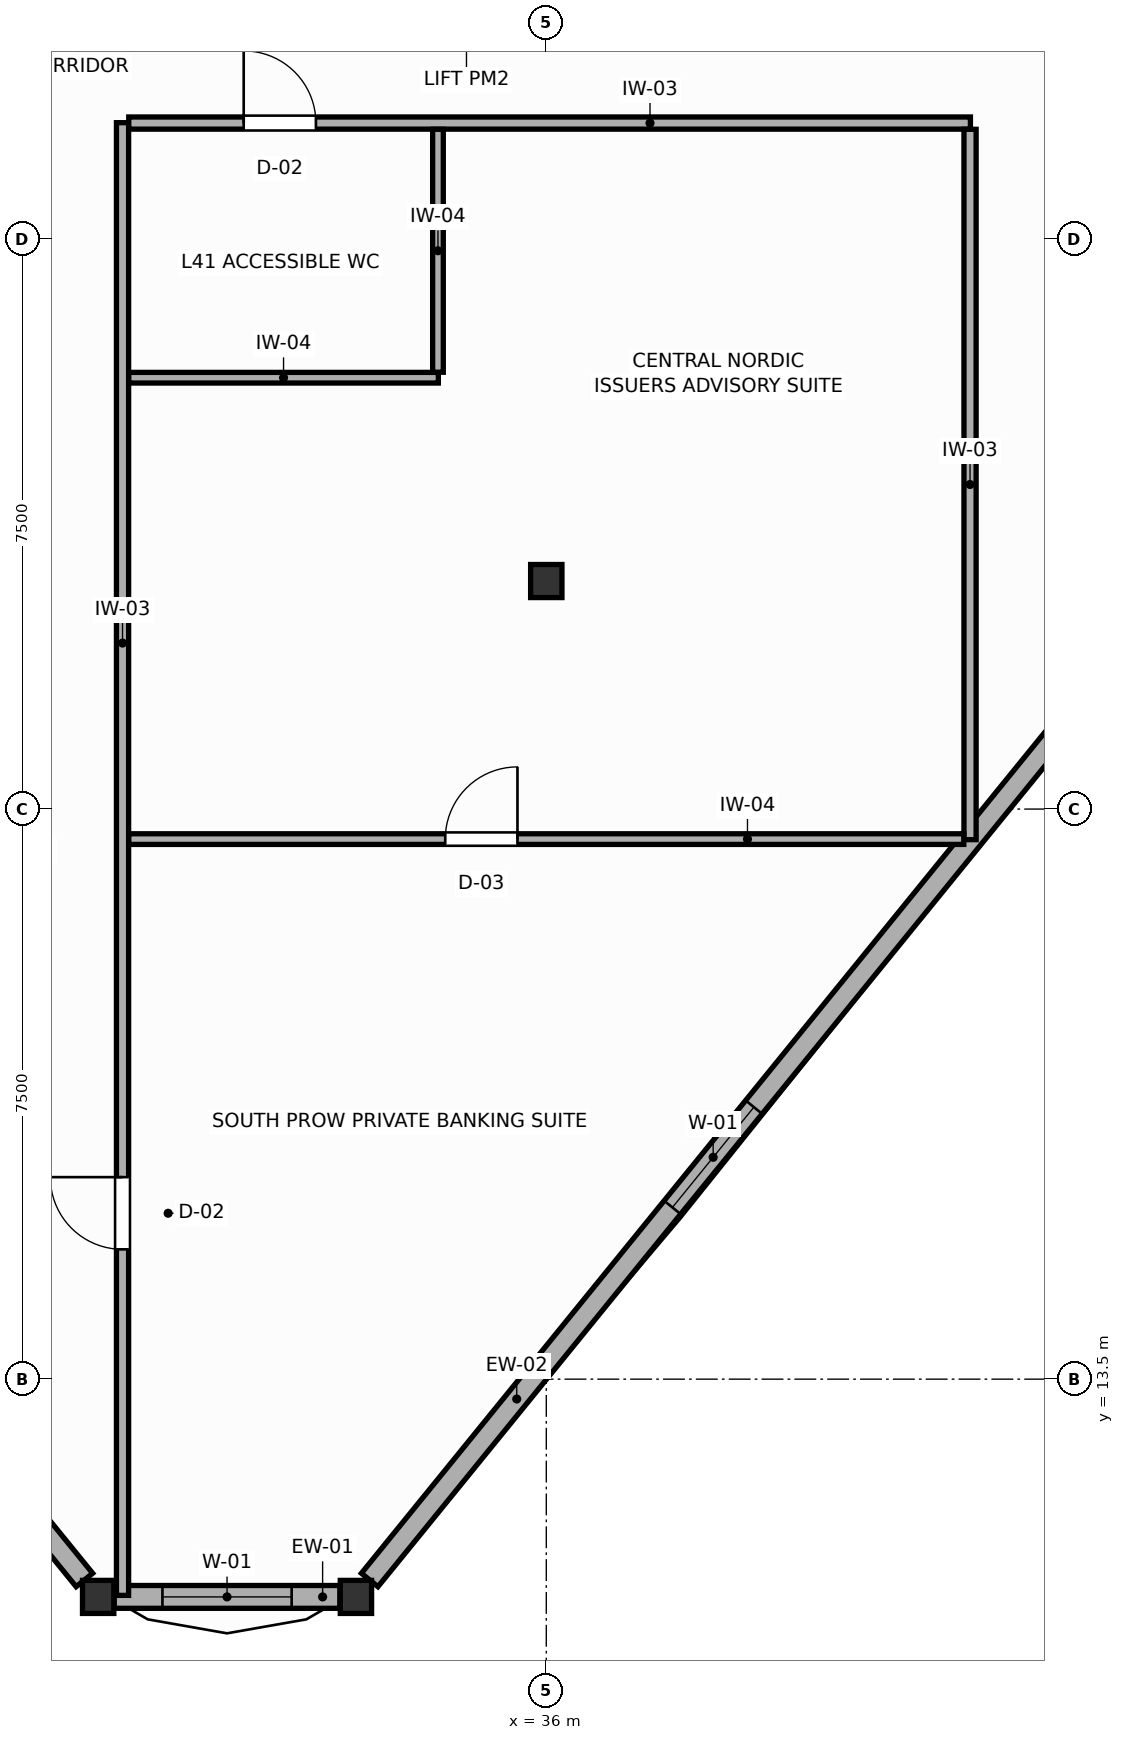
"""IFC4 building model, lengths in metres.
Left out: names, types, materials, properties, quantities, classifications, styles, units other than length and angle.
Written with IfcOpenShell. Run it as: python <this file> out.ifc"""

import sys

from ifc_helpers import new_model, si_unit, direction, frame, frame_2d, origin, origin_2d, place, context, subcontext, project, spatial, rectangle, i_section, extrude, source, transform, mapped, element, fill, save


model = new_model("IFC4")
c1 = context("Model", 3, precision=1e-05, world=origin(), true_north=direction((0.0, 1.0)))
c2 = subcontext(c1, "Body", "Model", "MODEL_VIEW")
j1 = project(units=[si_unit("LENGTHUNIT", "METRE"), si_unit("PLANEANGLEUNIT", "RADIAN")], contexts=[c1])
p1 = place(None, origin())
s1 = spatial("IfcSite", under=j1, at=p1, CompositionType="ELEMENT")
p2 = place(p1, origin())
s2 = spatial("IfcBuilding", under=s1, at=p2, CompositionType="ELEMENT")
p3 = place(p2, frame((0.0, 0.0, 161.4)))
s3 = spatial("IfcBuildingStorey", under=s2, at=p3, CompositionType="ELEMENT", Elevation=161.4)
m1 = source(origin(), c2, "Body", "SweptSolid", [
    extrude(i_section(OverallWidth=0.412, OverallDepth=0.435, WebThickness=0.033, FlangeThickness=0.053, FilletRadius=0.015, at=origin_2d()), origin(), (0.0, 0.0, 1.0), 3.6),
])
for number, where, z_axis, x_axis in (
    (1, (36.0, 24.0, 0.0), (0.0, 0.0, 1.0), (1.0, 0.0, 0.0)),
    (2, (30.104, 10.635, 0.0), (0.0, 0.0, 1.0), (1.0, 0.0, 0.0)),
    (3, (33.496, 10.635, 0.0), (0.0, 0.0, 1.0), (1.0, 0.0, 0.0)),
):
    element("IfcColumn", number, at=place(p3, frame(where, z_axis=z_axis, x_axis=x_axis)), inside=s3, PredefinedType="COLUMN", context=c2, shape_type="MappedRepresentation", body=[
        mapped(m1, transform((0.0, 0.0, 0.0), scale=1.0)),
    ])
p4 = place(p3, frame((20.885, 21.98, 0.0), z_axis=(0.0, 0.0, 1.0), x_axis=(0.630659963665, -0.776059282678, 0.0)))
e4 = element("IfcWall", 4, at=p4, inside=s3, PredefinedType="SOLIDWALL", context=c2, shape_type="SweptSolid", body=[
    extrude(rectangle(XDim=14.331, YDim=0.28, at=frame_2d((7.166, 0.0))), origin(), (0.0, 0.0, 1.0), 3.0),
])
p5 = place(p4, frame((6.316, 0.0, 0.75)))
e5 = element("IfcOpeningElement", 5, at=p5, cuts=e4, PredefinedType="OPENING", context=c2, shape_type="SweptSolid", body=[
    extrude(rectangle(XDim=1.7, YDim=1.75, at=frame_2d((0.85, 0.875))), frame((0.0, 0.15, 0.0), z_axis=(0.0, -1.0, 0.0), x_axis=(1.0, 0.0, 0.0)), (0.0, 0.0, 1.0), 0.3),
])
p6 = place(p3, frame((30.315, 10.635, 0.0), z_axis=(0.0, 0.0, 1.0), x_axis=(1.0, 0.0, 0.0)))
e6 = element("IfcWall", 6, at=p6, inside=s3, PredefinedType="SOLIDWALL", context=c2, shape_type="SweptSolid", body=[
    extrude(rectangle(XDim=2.969, YDim=0.3, at=frame_2d((1.485, 0.0))), origin(), (0.0, 0.0, 1.0), 3.0),
])
p7 = place(p6, frame((0.635, 0.0, 0.75)))
e7 = element("IfcOpeningElement", 7, at=p7, cuts=e6, PredefinedType="OPENING", context=c2, shape_type="SweptSolid", body=[
    extrude(rectangle(XDim=1.7, YDim=1.75, at=frame_2d((0.85, 0.875))), frame((0.0, 0.16, 0.0), z_axis=(0.0, -1.0, 0.0), x_axis=(1.0, 0.0, 0.0)), (0.0, 0.0, 1.0), 0.32),
])
p8 = place(p3, frame((33.677, 10.858, 0.0), z_axis=(0.0, 0.0, 1.0), x_axis=(0.630649703469, 0.776067620452, 0.0)))
e8 = element("IfcWall", 8, at=p8, inside=s3, PredefinedType="SOLIDWALL", context=c2, shape_type="SweptSolid", body=[
    extrude(rectangle(XDim=14.331, YDim=0.28, at=frame_2d((7.166, 0.0))), origin(), (0.0, 0.0, 1.0), 3.0),
])
p9 = place(p8, frame((6.316, 0.0, 0.75)))
e9 = element("IfcOpeningElement", 9, at=p9, cuts=e8, PredefinedType="OPENING", context=c2, shape_type="SweptSolid", body=[
    extrude(rectangle(XDim=1.7, YDim=1.75, at=frame_2d((0.85, 0.875))), frame((0.0, 0.15, 0.0), z_axis=(0.0, -1.0, 0.0), x_axis=(1.0, 0.0, 0.0)), (0.0, 0.0, 1.0), 0.3),
])
p10 = place(p3, frame((30.425, 10.655, 0.0), z_axis=(0.0, 0.0, 1.0), x_axis=(0.0, 1.0, 0.0)))
e10 = element("IfcWall", 10, at=p10, inside=s3, PredefinedType="PARTITIONING", context=c2, shape_type="SweptSolid", body=[
    extrude(rectangle(XDim=19.375, YDim=0.16, at=frame_2d((9.688, 0.0))), origin(), (0.0, 0.0, 1.0), 3.4),
])
p11 = place(p10, frame((4.552, 0.0, 0.0)))
e11 = element("IfcOpeningElement", 11, at=p11, cuts=e10, PredefinedType="OPENING", context=c2, shape_type="SweptSolid", body=[
    extrude(rectangle(XDim=0.95, YDim=2.05, at=frame_2d((0.475, 1.025))), frame((0.0, 0.09, 0.0), z_axis=(0.0, -1.0, 0.0), x_axis=(1.0, 0.0, 0.0)), (0.0, 0.0, 1.0), 0.18),
])
p12 = place(p3, frame((30.507, 30.025, 0.0), z_axis=(0.0, 0.0, 1.0), x_axis=(1.0, 0.0, 0.0)))
e12 = element("IfcWall", 12, at=p12, inside=s3, PredefinedType="PARTITIONING", context=c2, shape_type="SweptSolid", body=[
    extrude(rectangle(XDim=11.073, YDim=0.16, at=frame_2d((5.537, 0.0))), origin(), (0.0, 0.0, 1.0), 3.4),
])
p13 = place(p12, frame((1.512, 0.0, 0.0)))
e13 = element("IfcOpeningElement", 13, at=p13, cuts=e12, PredefinedType="OPENING", context=c2, shape_type="SweptSolid", body=[
    extrude(rectangle(XDim=0.95, YDim=2.05, at=frame_2d((0.475, 1.025))), frame((0.0, 0.09, 0.0), z_axis=(0.0, -1.0, 0.0), x_axis=(1.0, 0.0, 0.0)), (0.0, 0.0, 1.0), 0.18),
])
p14 = place(p3, frame((41.575, 20.598, 0.0), z_axis=(0.0, 0.0, 1.0), x_axis=(0.0, 1.0, 0.0)))
e14 = element("IfcWall", 14, at=p14, inside=s3, PredefinedType="PARTITIONING", context=c2, shape_type="SweptSolid", body=[
    extrude(rectangle(XDim=9.345, YDim=0.16, at=frame_2d((4.673, 0.0))), origin(), (0.0, 0.0, 1.0), 3.4),
])
p15 = place(p3, frame((30.507, 20.605, 0.0), z_axis=(0.0, 0.0, 1.0), x_axis=(1.0, 0.0, 0.0)))
e15 = element("IfcWall", 15, at=p15, inside=s3, PredefinedType="PARTITIONING", context=c2, shape_type="SweptSolid", body=[
    extrude(rectangle(XDim=10.986, YDim=0.14, at=frame_2d((5.493, 0.0))), origin(), (0.0, 0.0, 1.0), 3.4),
])
p16 = place(p15, frame((4.164, 0.0, 0.0)))
e16 = element("IfcOpeningElement", 16, at=p16, cuts=e15, PredefinedType="OPENING", context=c2, shape_type="SweptSolid", body=[
    extrude(rectangle(XDim=0.95, YDim=2.05, at=frame_2d((0.475, 1.025))), frame((0.0, 0.08, 0.0), z_axis=(0.0, -1.0, 0.0), x_axis=(1.0, 0.0, 0.0)), (0.0, 0.0, 1.0), 0.16),
])
p17 = place(p3, frame((30.507, 26.675, 0.0), z_axis=(0.0, 0.0, 1.0), x_axis=(1.0, 0.0, 0.0)))
e17 = element("IfcWall", 17, at=p17, inside=s3, PredefinedType="PARTITIONING", context=c2, shape_type="SweptSolid", body=[
    extrude(rectangle(XDim=4.073, YDim=0.14, at=frame_2d((2.037, 0.0))), origin(), (0.0, 0.0, 1.0), 3.4),
])
p18 = place(p3, frame((34.575, 26.747, 0.0), z_axis=(0.0, 0.0, 1.0), x_axis=(0.0, 1.0, 0.0)))
e18 = element("IfcWall", 18, at=p18, inside=s3, PredefinedType="PARTITIONING", context=c2, shape_type="SweptSolid", body=[
    extrude(rectangle(XDim=3.196, YDim=0.14, at=frame_2d((1.598, 0.0))), origin(), (0.0, 0.0, 1.0), 3.4),
])
p19 = place(p7, origin())
e19 = element("IfcWindow", 19, at=p19, inside=s3, PartitioningType="SINGLE_PANEL", PredefinedType="WINDOW", context=c2, shape_type="SweptSolid", body=[
    extrude(rectangle(XDim=1.7, YDim=1.75, at=frame_2d((0.85, 0.875))), frame((0.0, 0.03, 0.0), z_axis=(0.0, -1.0, 0.0), x_axis=(1.0, 0.0, 0.0)), (0.0, 0.0, 1.0), 0.06),
])
fill(e7, e19)
p20 = place(p9, origin())
e20 = element("IfcWindow", 20, at=p20, inside=s3, PartitioningType="SINGLE_PANEL", PredefinedType="WINDOW", context=c2, shape_type="SweptSolid", body=[
    extrude(rectangle(XDim=1.7, YDim=1.75, at=frame_2d((0.85, 0.875))), frame((0.0, 0.03, 0.0), z_axis=(0.0, -1.0, 0.0), x_axis=(1.0, 0.0, 0.0)), (0.0, 0.0, 1.0), 0.06),
])
fill(e9, e20)
p21 = place(p11, origin())
e21 = element("IfcDoor", 21, at=p21, inside=s3, OperationType="SINGLE_SWING_RIGHT", PredefinedType="DOOR", context=c2, shape_type="SweptSolid", body=[
    extrude(rectangle(XDim=0.95, YDim=2.05, at=frame_2d((0.475, 1.025))), frame((0.0, 0.025, 0.0), z_axis=(0.0, -1.0, 0.0), x_axis=(1.0, 0.0, 0.0)), (0.0, 0.0, 1.0), 0.05),
])
fill(e11, e21)
p22 = place(p13, origin())
e22 = element("IfcDoor", 22, at=p22, inside=s3, OperationType="SINGLE_SWING_LEFT", PredefinedType="DOOR", context=c2, shape_type="SweptSolid", body=[
    extrude(rectangle(XDim=0.95, YDim=2.05, at=frame_2d((0.475, 1.025))), frame((0.0, 0.025, 0.0), z_axis=(0.0, -1.0, 0.0), x_axis=(1.0, 0.0, 0.0)), (0.0, 0.0, 1.0), 0.05),
])
fill(e13, e22)
p23 = place(p16, origin())
e23 = element("IfcDoor", 23, at=p23, inside=s3, OperationType="SINGLE_SWING_RIGHT", PredefinedType="DOOR", context=c2, shape_type="SweptSolid", body=[
    extrude(rectangle(XDim=0.95, YDim=2.05, at=frame_2d((0.475, 1.025))), frame((0.0, 0.025, 0.0), z_axis=(0.0, -1.0, 0.0), x_axis=(1.0, 0.0, 0.0)), (0.0, 0.0, 1.0), 0.05),
])
fill(e16, e23)
save(model, sys.argv[1])
